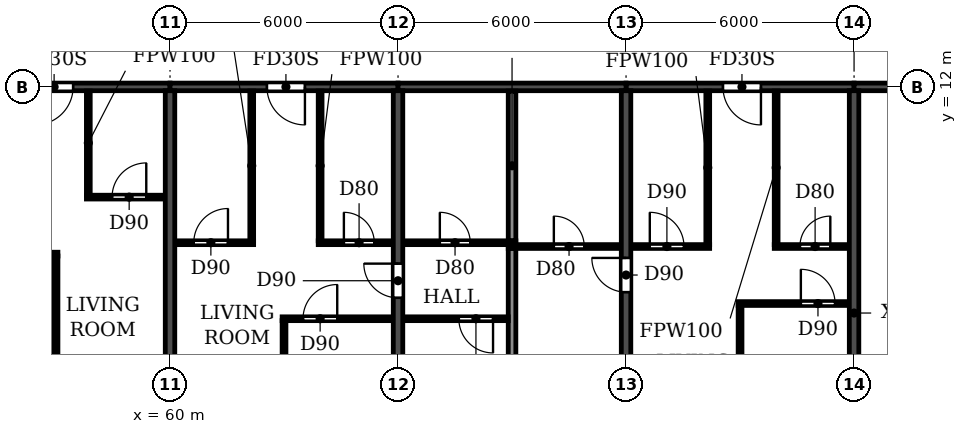
"""IFC4 building model, lengths in metres.
Left out: names, types, materials, properties, quantities, classifications, styles, units other than length and angle.
Written with IfcOpenShell. Run it as: python <this file> out.ifc"""

import sys

from ifc_helpers import new_model, si_unit, direction, frame, frame_2d, origin, place, context, subcontext, project, spatial, rectangle, extrude, element, fill, save


model = new_model("IFC4")
c1 = context("Model", 3, precision=1e-05, world=origin(), true_north=direction((0.0, 1.0)))
c2 = subcontext(c1, "Body", "Model", "MODEL_VIEW")
j1 = project(units=[si_unit("LENGTHUNIT", "METRE"), si_unit("PLANEANGLEUNIT", "RADIAN")], contexts=[c1])
p1 = place(None, origin())
s1 = spatial("IfcSite", under=j1, at=p1, CompositionType="ELEMENT")
p2 = place(p1, origin())
s2 = spatial("IfcBuilding", under=s1, at=p2, CompositionType="ELEMENT")
p3 = place(p2, frame((0.0, 0.0, 181.8)))
s3 = spatial("IfcBuildingStorey", under=s2, at=p3, CompositionType="ELEMENT", Elevation=181.8)
p4 = place(p3, frame((60.0, 0.2, 0.0), z_axis=(0.0, 0.0, 1.0), x_axis=(0.0, 1.0, 0.0)))
e1 = element("IfcWall", 1, at=p4, inside=s3, PredefinedType="SHEAR", context=c2, shape_type="SweptSolid", body=[
    extrude(rectangle(XDim=11.7, YDim=0.25, at=frame_2d((5.85, 0.0))), origin(), (0.0, 0.0, 1.0), 3.08),
])
p5 = place(p3, frame((66.0, 0.2, 0.0), z_axis=(0.0, 0.0, 1.0), x_axis=(0.0, 1.0, 0.0)))
e2 = element("IfcWall", 2, at=p5, inside=s3, PredefinedType="SHEAR", context=c2, shape_type="SweptSolid", body=[
    extrude(rectangle(XDim=11.7, YDim=0.25, at=frame_2d((5.85, 0.0))), origin(), (0.0, 0.0, 1.0), 3.08),
])
p6 = place(p5, frame((6.25, 0.0, 0.0)))
e3 = element("IfcOpeningElement", 3, at=p6, cuts=e2, PredefinedType="OPENING", context=c2, shape_type="SweptSolid", body=[
    extrude(rectangle(XDim=0.9, YDim=2.1, at=frame_2d((0.45, 1.05))), frame((0.0, 0.135, 0.0), z_axis=(0.0, -1.0, 0.0), x_axis=(1.0, 0.0, 0.0)), (0.0, 0.0, 1.0), 0.27),
])
p7 = place(p3, frame((72.0, 0.2, 0.0), z_axis=(0.0, 0.0, 1.0), x_axis=(0.0, 1.0, 0.0)))
e4 = element("IfcWall", 4, at=p7, inside=s3, PredefinedType="SHEAR", context=c2, shape_type="SweptSolid", body=[
    extrude(rectangle(XDim=11.7, YDim=0.25, at=frame_2d((5.85, 0.0))), origin(), (0.0, 0.0, 1.0), 3.08),
])
p8 = place(p7, frame((6.4, 0.0, 0.0)))
e5 = element("IfcOpeningElement", 5, at=p8, cuts=e4, PredefinedType="OPENING", context=c2, shape_type="SweptSolid", body=[
    extrude(rectangle(XDim=0.9, YDim=2.1, at=frame_2d((0.45, 1.05))), frame((0.0, 0.135, 0.0), z_axis=(0.0, -1.0, 0.0), x_axis=(1.0, 0.0, 0.0)), (0.0, 0.0, 1.0), 0.27),
])
p9 = place(p3, frame((78.0, 0.2, 0.0), z_axis=(0.0, 0.0, 1.0), x_axis=(0.0, 1.0, 0.0)))
e6 = element("IfcWall", 6, at=p9, inside=s3, PredefinedType="SHEAR", context=c2, shape_type="SweptSolid", body=[
    extrude(rectangle(XDim=11.7, YDim=0.25, at=frame_2d((5.85, 0.0))), origin(), (0.0, 0.0, 1.0), 3.08),
])
p10 = place(p3, frame((54.0, 12.0, 0.0), z_axis=(0.0, 0.0, 1.0), x_axis=(1.0, 0.0, 0.0)))
e7 = element("IfcWall", 7, at=p10, inside=s3, PredefinedType="SHEAR", context=c2, shape_type="SweptSolid", body=[
    extrude(rectangle(XDim=6.0, YDim=0.2, at=frame_2d((3.0, 0.0))), origin(), (0.0, 0.0, 1.0), 2.48),
])
p11 = place(p10, frame((2.45, 0.0, 0.0)))
e8 = element("IfcOpeningElement", 8, at=p11, cuts=e7, PredefinedType="OPENING", context=c2, shape_type="SweptSolid", body=[
    extrude(rectangle(XDim=1.0, YDim=2.1, at=frame_2d((0.5, 1.05))), frame((0.0, 0.11, 0.0), z_axis=(0.0, -1.0, 0.0), x_axis=(1.0, 0.0, 0.0)), (0.0, 0.0, 1.0), 0.22),
])
p12 = place(p3, frame((60.0, 12.0, 0.0), z_axis=(0.0, 0.0, 1.0), x_axis=(1.0, 0.0, 0.0)))
e9 = element("IfcWall", 9, at=p12, inside=s3, PredefinedType="SHEAR", context=c2, shape_type="SweptSolid", body=[
    extrude(rectangle(XDim=6.0, YDim=0.2, at=frame_2d((3.0, 0.0))), origin(), (0.0, 0.0, 1.0), 2.48),
])
p13 = place(p12, frame((2.55, 0.0, 0.0)))
e10 = element("IfcOpeningElement", 10, at=p13, cuts=e9, PredefinedType="OPENING", context=c2, shape_type="SweptSolid", body=[
    extrude(rectangle(XDim=1.0, YDim=2.1, at=frame_2d((0.5, 1.05))), frame((0.0, 0.11, 0.0), z_axis=(0.0, -1.0, 0.0), x_axis=(1.0, 0.0, 0.0)), (0.0, 0.0, 1.0), 0.22),
])
p14 = place(p3, frame((66.0, 12.0, 0.0), z_axis=(0.0, 0.0, 1.0), x_axis=(1.0, 0.0, 0.0)))
e11 = element("IfcWall", 11, at=p14, inside=s3, PredefinedType="SHEAR", context=c2, shape_type="SweptSolid", body=[
    extrude(rectangle(XDim=6.0, YDim=0.2, at=frame_2d((3.0, 0.0))), origin(), (0.0, 0.0, 1.0), 2.48),
])
p15 = place(p3, frame((72.0, 12.0, 0.0), z_axis=(0.0, 0.0, 1.0), x_axis=(1.0, 0.0, 0.0)))
e12 = element("IfcWall", 12, at=p15, inside=s3, PredefinedType="SHEAR", context=c2, shape_type="SweptSolid", body=[
    extrude(rectangle(XDim=6.0, YDim=0.2, at=frame_2d((3.0, 0.0))), origin(), (0.0, 0.0, 1.0), 2.48),
])
p16 = place(p15, frame((2.55, 0.0, 0.0)))
e13 = element("IfcOpeningElement", 13, at=p16, cuts=e12, PredefinedType="OPENING", context=c2, shape_type="SweptSolid", body=[
    extrude(rectangle(XDim=1.0, YDim=2.1, at=frame_2d((0.5, 1.05))), frame((0.0, 0.11, 0.0), z_axis=(0.0, -1.0, 0.0), x_axis=(1.0, 0.0, 0.0)), (0.0, 0.0, 1.0), 0.22),
])
p17 = place(p3, frame((78.0, 12.0, 0.0), z_axis=(0.0, 0.0, 1.0), x_axis=(1.0, 0.0, 0.0)))
e14 = element("IfcWall", 14, at=p17, inside=s3, PredefinedType="SHEAR", context=c2, shape_type="SweptSolid", body=[
    extrude(rectangle(XDim=5.8, YDim=0.2, at=frame_2d((2.9, 0.0))), origin(), (0.0, 0.0, 1.0), 2.48),
])
p18 = place(p17, frame((2.5, 0.0, 0.0)))
e15 = element("IfcOpeningElement", 15, at=p18, cuts=e14, PredefinedType="OPENING", context=c2, shape_type="SweptSolid", body=[
    extrude(rectangle(XDim=1.0, YDim=2.1, at=frame_2d((0.5, 1.05))), frame((0.0, 0.11, 0.0), z_axis=(0.0, -1.0, 0.0), x_axis=(1.0, 0.0, 0.0)), (0.0, 0.0, 1.0), 0.22),
])
p19 = place(p3, frame((69.0, 0.06, 0.0), z_axis=(0.0, 0.0, 1.0), x_axis=(0.0, 1.0, 0.0)))
e16 = element("IfcWall", 16, at=p19, inside=s3, PredefinedType="PARTITIONING", context=c2, shape_type="SweptSolid", body=[
    extrude(rectangle(XDim=7.69, YDim=0.2, at=frame_2d((3.845, 0.0))), origin(), (0.0, 0.0, 1.0), 3.08),
])
p20 = place(p3, frame((69.0, 7.95, 0.0), z_axis=(0.0, 0.0, 1.0), x_axis=(0.0, 1.0, 0.0)))
e17 = element("IfcWall", 17, at=p20, inside=s3, PredefinedType="PARTITIONING", context=c2, shape_type="SweptSolid", body=[
    extrude(rectangle(XDim=3.94, YDim=0.2, at=frame_2d((1.97, 0.0))), origin(), (0.0, 0.0, 1.0), 3.08),
])
p21 = place(p3, frame((62.95, 5.9, 0.0), z_axis=(0.0, 0.0, 1.0), x_axis=(1.0, 0.0, 0.0)))
e18 = element("IfcWall", 18, at=p21, inside=s3, PredefinedType="PARTITIONING", context=c2, shape_type="SweptSolid", body=[
    extrude(rectangle(XDim=2.915, YDim=0.1, at=frame_2d((1.458, 0.0))), origin(), (0.0, 0.0, 1.0), 3.08),
])
p22 = place(p21, frame((0.55, 0.0, 0.0)))
e19 = element("IfcOpeningElement", 19, at=p22, cuts=e18, PredefinedType="OPENING", context=c2, shape_type="SweptSolid", body=[
    extrude(rectangle(XDim=0.9, YDim=2.1, at=frame_2d((0.45, 1.05))), frame((0.0, 0.06, 0.0), z_axis=(0.0, -1.0, 0.0), x_axis=(1.0, 0.0, 0.0)), (0.0, 0.0, 1.0), 0.12),
])
p23 = place(p3, frame((66.135, 5.9, 0.0), z_axis=(0.0, 0.0, 1.0), x_axis=(1.0, 0.0, 0.0)))
e20 = element("IfcWall", 20, at=p23, inside=s3, PredefinedType="PARTITIONING", context=c2, shape_type="SweptSolid", body=[
    extrude(rectangle(XDim=2.765, YDim=0.1, at=frame_2d((1.382, 0.0))), origin(), (0.0, 0.0, 1.0), 3.08),
])
p24 = place(p23, frame((1.465, 0.0, 0.0)))
e21 = element("IfcOpeningElement", 21, at=p24, cuts=e20, PredefinedType="OPENING", context=c2, shape_type="SweptSolid", body=[
    extrude(rectangle(XDim=0.9, YDim=2.1, at=frame_2d((0.45, 1.05))), frame((0.0, 0.06, 0.0), z_axis=(0.0, -1.0, 0.0), x_axis=(1.0, 0.0, 0.0)), (0.0, 0.0, 1.0), 0.12),
])
p25 = place(p3, frame((74.95, 6.3, 0.0), z_axis=(0.0, 0.0, 1.0), x_axis=(1.0, 0.0, 0.0)))
e22 = element("IfcWall", 22, at=p25, inside=s3, PredefinedType="PARTITIONING", context=c2, shape_type="SweptSolid", body=[
    extrude(rectangle(XDim=2.915, YDim=0.1, at=frame_2d((1.458, 0.0))), origin(), (0.0, 0.0, 1.0), 3.08),
])
p26 = place(p25, frame((1.65, 0.0, 0.0)))
e23 = element("IfcOpeningElement", 23, at=p26, cuts=e22, PredefinedType="OPENING", context=c2, shape_type="SweptSolid", body=[
    extrude(rectangle(XDim=0.9, YDim=2.1, at=frame_2d((0.45, 1.05))), frame((0.0, 0.06, 0.0), z_axis=(0.0, -1.0, 0.0), x_axis=(1.0, 0.0, 0.0)), (0.0, 0.0, 1.0), 0.12),
])
p27 = place(p3, frame((54.135, 7.6, 0.0), z_axis=(0.0, 0.0, 1.0), x_axis=(1.0, 0.0, 0.0)))
e24 = element("IfcWall", 24, at=p27, inside=s3, PredefinedType="PARTITIONING", context=c2, shape_type="SweptSolid", body=[
    extrude(rectangle(XDim=2.915, YDim=0.1, at=frame_2d((1.458, 0.0))), origin(), (0.0, 0.0, 1.0), 3.08),
])
p28 = place(p27, frame((0.365, 0.0, 0.0)))
e25 = element("IfcOpeningElement", 25, at=p28, cuts=e24, PredefinedType="OPENING", context=c2, shape_type="SweptSolid", body=[
    extrude(rectangle(XDim=0.9, YDim=2.1, at=frame_2d((0.45, 1.05))), frame((0.0, 0.06, 0.0), z_axis=(0.0, -1.0, 0.0), x_axis=(1.0, 0.0, 0.0)), (0.0, 0.0, 1.0), 0.12),
])
p29 = place(p3, frame((68.9, 7.8, 0.0), z_axis=(0.0, 0.0, 1.0), x_axis=(1.0, 0.0, 0.0)))
e26 = element("IfcWall", 26, at=p29, inside=s3, PredefinedType="PARTITIONING", context=c2, shape_type="SweptSolid", body=[
    extrude(rectangle(XDim=2.965, YDim=0.1, at=frame_2d((1.482, 0.0))), origin(), (0.0, 0.0, 1.0), 3.08),
])
p30 = place(p29, frame((1.2, 0.0, 0.0)))
e27 = element("IfcOpeningElement", 27, at=p30, cuts=e26, PredefinedType="OPENING", context=c2, shape_type="SweptSolid", body=[
    extrude(rectangle(XDim=0.8, YDim=2.1, at=frame_2d((0.4, 1.05))), frame((0.0, 0.06, 0.0), z_axis=(0.0, -1.0, 0.0), x_axis=(1.0, 0.0, 0.0)), (0.0, 0.0, 1.0), 0.12),
])
p31 = place(p3, frame((72.135, 7.8, 0.0), z_axis=(0.0, 0.0, 1.0), x_axis=(1.0, 0.0, 0.0)))
e28 = element("IfcWall", 28, at=p31, inside=s3, PredefinedType="PARTITIONING", context=c2, shape_type="SweptSolid", body=[
    extrude(rectangle(XDim=2.065, YDim=0.1, at=frame_2d((1.032, 0.0))), origin(), (0.0, 0.0, 1.0), 3.08),
])
p32 = place(p31, frame((0.49, 0.0, 0.0)))
e29 = element("IfcOpeningElement", 29, at=p32, cuts=e28, PredefinedType="OPENING", context=c2, shape_type="SweptSolid", body=[
    extrude(rectangle(XDim=0.9, YDim=2.1, at=frame_2d((0.45, 1.05))), frame((0.0, 0.06, 0.0), z_axis=(0.0, -1.0, 0.0), x_axis=(1.0, 0.0, 0.0)), (0.0, 0.0, 1.0), 0.12),
])
p33 = place(p3, frame((75.9, 7.8, 0.0), z_axis=(0.0, 0.0, 1.0), x_axis=(1.0, 0.0, 0.0)))
e30 = element("IfcWall", 30, at=p33, inside=s3, PredefinedType="PARTITIONING", context=c2, shape_type="SweptSolid", body=[
    extrude(rectangle(XDim=1.965, YDim=0.1, at=frame_2d((0.982, 0.0))), origin(), (0.0, 0.0, 1.0), 3.08),
])
p34 = place(p33, frame((0.675, 0.0, 0.0)))
e31 = element("IfcOpeningElement", 31, at=p34, cuts=e30, PredefinedType="OPENING", context=c2, shape_type="SweptSolid", body=[
    extrude(rectangle(XDim=0.8, YDim=2.1, at=frame_2d((0.4, 1.05))), frame((0.0, 0.06, 0.0), z_axis=(0.0, -1.0, 0.0), x_axis=(1.0, 0.0, 0.0)), (0.0, 0.0, 1.0), 0.12),
])
p35 = place(p3, frame((60.135, 7.9, 0.0), z_axis=(0.0, 0.0, 1.0), x_axis=(1.0, 0.0, 0.0)))
e32 = element("IfcWall", 32, at=p35, inside=s3, PredefinedType="PARTITIONING", context=c2, shape_type="SweptSolid", body=[
    extrude(rectangle(XDim=2.065, YDim=0.1, at=frame_2d((1.032, 0.0))), origin(), (0.0, 0.0, 1.0), 3.08),
])
p36 = place(p35, frame((0.49, 0.0, 0.0)))
e33 = element("IfcOpeningElement", 33, at=p36, cuts=e32, PredefinedType="OPENING", context=c2, shape_type="SweptSolid", body=[
    extrude(rectangle(XDim=0.9, YDim=2.1, at=frame_2d((0.45, 1.05))), frame((0.0, 0.06, 0.0), z_axis=(0.0, -1.0, 0.0), x_axis=(1.0, 0.0, 0.0)), (0.0, 0.0, 1.0), 0.12),
])
p37 = place(p3, frame((63.9, 7.9, 0.0), z_axis=(0.0, 0.0, 1.0), x_axis=(1.0, 0.0, 0.0)))
e34 = element("IfcWall", 34, at=p37, inside=s3, PredefinedType="PARTITIONING", context=c2, shape_type="SweptSolid", body=[
    extrude(rectangle(XDim=1.965, YDim=0.1, at=frame_2d((0.982, 0.0))), origin(), (0.0, 0.0, 1.0), 3.08),
])
p38 = place(p37, frame((0.675, 0.0, 0.0)))
e35 = element("IfcOpeningElement", 35, at=p38, cuts=e34, PredefinedType="OPENING", context=c2, shape_type="SweptSolid", body=[
    extrude(rectangle(XDim=0.8, YDim=2.1, at=frame_2d((0.4, 1.05))), frame((0.0, 0.06, 0.0), z_axis=(0.0, -1.0, 0.0), x_axis=(1.0, 0.0, 0.0)), (0.0, 0.0, 1.0), 0.12),
])
p39 = place(p3, frame((66.135, 7.9, 0.0), z_axis=(0.0, 0.0, 1.0), x_axis=(1.0, 0.0, 0.0)))
e36 = element("IfcWall", 36, at=p39, inside=s3, PredefinedType="PARTITIONING", context=c2, shape_type="SweptSolid", body=[
    extrude(rectangle(XDim=2.965, YDim=0.1, at=frame_2d((1.482, 0.0))), origin(), (0.0, 0.0, 1.0), 3.08),
])
p40 = place(p39, frame((0.965, 0.0, 0.0)))
e37 = element("IfcOpeningElement", 37, at=p40, cuts=e36, PredefinedType="OPENING", context=c2, shape_type="SweptSolid", body=[
    extrude(rectangle(XDim=0.8, YDim=2.1, at=frame_2d((0.4, 1.05))), frame((0.0, 0.06, 0.0), z_axis=(0.0, -1.0, 0.0), x_axis=(1.0, 0.0, 0.0)), (0.0, 0.0, 1.0), 0.12),
])
p41 = place(p3, frame((57.8, 9.1, 0.0), z_axis=(0.0, 0.0, 1.0), x_axis=(1.0, 0.0, 0.0)))
e38 = element("IfcWall", 38, at=p41, inside=s3, PredefinedType="PARTITIONING", context=c2, shape_type="SweptSolid", body=[
    extrude(rectangle(XDim=2.065, YDim=0.1, at=frame_2d((1.032, 0.0))), origin(), (0.0, 0.0, 1.0), 3.08),
])
p42 = place(p41, frame((0.675, 0.0, 0.0)))
e39 = element("IfcOpeningElement", 39, at=p42, cuts=e38, PredefinedType="OPENING", context=c2, shape_type="SweptSolid", body=[
    extrude(rectangle(XDim=0.9, YDim=2.1, at=frame_2d((0.45, 1.05))), frame((0.0, 0.06, 0.0), z_axis=(0.0, -1.0, 0.0), x_axis=(1.0, 0.0, 0.0)), (0.0, 0.0, 1.0), 0.12),
])
p43 = place(p3, frame((57.0, 0.06, 0.0), z_axis=(0.0, 0.0, 1.0), x_axis=(0.0, 1.0, 0.0)))
e40 = element("IfcWall", 40, at=p43, inside=s3, PredefinedType="PARTITIONING", context=c2, shape_type="SweptSolid", body=[
    extrude(rectangle(XDim=7.49, YDim=0.1, at=frame_2d((3.745, 0.0))), origin(), (0.0, 0.0, 1.0), 3.08),
])
p44 = place(p3, frame((57.85, 9.15, 0.0), z_axis=(0.0, 0.0, 1.0), x_axis=(0.0, 1.0, 0.0)))
e41 = element("IfcWall", 41, at=p44, inside=s3, PredefinedType="PARTITIONING", context=c2, shape_type="SweptSolid", body=[
    extrude(rectangle(XDim=2.74, YDim=0.1, at=frame_2d((1.37, 0.0))), origin(), (0.0, 0.0, 1.0), 3.08),
])
p45 = place(p3, frame((62.15, 7.95, 0.0), z_axis=(0.0, 0.0, 1.0), x_axis=(0.0, 1.0, 0.0)))
e42 = element("IfcWall", 42, at=p45, inside=s3, PredefinedType="PARTITIONING", context=c2, shape_type="SweptSolid", body=[
    extrude(rectangle(XDim=3.94, YDim=0.1, at=frame_2d((1.97, 0.0))), origin(), (0.0, 0.0, 1.0), 3.08),
])
p46 = place(p3, frame((63.0, 0.06, 0.0), z_axis=(0.0, 0.0, 1.0), x_axis=(0.0, 1.0, 0.0)))
e43 = element("IfcWall", 43, at=p46, inside=s3, PredefinedType="PARTITIONING", context=c2, shape_type="SweptSolid", body=[
    extrude(rectangle(XDim=5.79, YDim=0.1, at=frame_2d((2.895, 0.0))), origin(), (0.0, 0.0, 1.0), 3.08),
])
p47 = place(p3, frame((63.95, 7.95, 0.0), z_axis=(0.0, 0.0, 1.0), x_axis=(0.0, 1.0, 0.0)))
e44 = element("IfcWall", 44, at=p47, inside=s3, PredefinedType="PARTITIONING", context=c2, shape_type="SweptSolid", body=[
    extrude(rectangle(XDim=3.94, YDim=0.1, at=frame_2d((1.97, 0.0))), origin(), (0.0, 0.0, 1.0), 3.08),
])
p48 = place(p3, frame((74.15, 7.85, 0.0), z_axis=(0.0, 0.0, 1.0), x_axis=(0.0, 1.0, 0.0)))
e45 = element("IfcWall", 45, at=p48, inside=s3, PredefinedType="PARTITIONING", context=c2, shape_type="SweptSolid", body=[
    extrude(rectangle(XDim=4.04, YDim=0.1, at=frame_2d((2.02, 0.0))), origin(), (0.0, 0.0, 1.0), 3.08),
])
p49 = place(p3, frame((75.0, 0.06, 0.0), z_axis=(0.0, 0.0, 1.0), x_axis=(0.0, 1.0, 0.0)))
e46 = element("IfcWall", 46, at=p49, inside=s3, PredefinedType="PARTITIONING", context=c2, shape_type="SweptSolid", body=[
    extrude(rectangle(XDim=6.19, YDim=0.1, at=frame_2d((3.095, 0.0))), origin(), (0.0, 0.0, 1.0), 3.08),
])
p50 = place(p3, frame((75.95, 7.85, 0.0), z_axis=(0.0, 0.0, 1.0), x_axis=(0.0, 1.0, 0.0)))
e47 = element("IfcWall", 47, at=p50, inside=s3, PredefinedType="PARTITIONING", context=c2, shape_type="SweptSolid", body=[
    extrude(rectangle(XDim=4.04, YDim=0.1, at=frame_2d((2.02, 0.0))), origin(), (0.0, 0.0, 1.0), 3.08),
])
p51 = place(p11, frame((1.0, 0.0, 0.0), z_axis=(0.0, 0.0, 1.0), x_axis=(-1.0, 0.0, 0.0)))
e48 = element("IfcDoor", 48, at=p51, inside=s3, OperationType="SINGLE_SWING_RIGHT", PredefinedType="DOOR", context=c2, shape_type="SweptSolid", body=[
    extrude(rectangle(XDim=1.0, YDim=2.1, at=frame_2d((0.5, 1.05))), frame((0.0, 0.025, 0.0), z_axis=(0.0, -1.0, 0.0), x_axis=(1.0, 0.0, 0.0)), (0.0, 0.0, 1.0), 0.05),
])
fill(e8, e48)
p52 = place(p42, origin())
e49 = element("IfcDoor", 49, at=p52, inside=s3, OperationType="SINGLE_SWING_RIGHT", PredefinedType="DOOR", context=c2, shape_type="SweptSolid", body=[
    extrude(rectangle(XDim=0.9, YDim=2.1, at=frame_2d((0.45, 1.05))), frame((0.0, 0.025, 0.0), z_axis=(0.0, -1.0, 0.0), x_axis=(1.0, 0.0, 0.0)), (0.0, 0.0, 1.0), 0.05),
])
fill(e39, e49)
p53 = place(p40, origin())
e50 = element("IfcDoor", 50, at=p53, inside=s3, OperationType="SINGLE_SWING_LEFT", PredefinedType="DOOR", context=c2, shape_type="SweptSolid", body=[
    extrude(rectangle(XDim=0.8, YDim=2.1, at=frame_2d((0.4, 1.05))), frame((0.0, 0.025, 0.0), z_axis=(0.0, -1.0, 0.0), x_axis=(1.0, 0.0, 0.0)), (0.0, 0.0, 1.0), 0.05),
])
fill(e37, e50)
p54 = place(p24, frame((0.9, 0.0, 0.0), z_axis=(0.0, 0.0, 1.0), x_axis=(-1.0, 0.0, 0.0)))
e51 = element("IfcDoor", 51, at=p54, inside=s3, OperationType="SINGLE_SWING_LEFT", PredefinedType="DOOR", context=c2, shape_type="SweptSolid", body=[
    extrude(rectangle(XDim=0.9, YDim=2.1, at=frame_2d((0.45, 1.05))), frame((0.0, 0.025, 0.0), z_axis=(0.0, -1.0, 0.0), x_axis=(1.0, 0.0, 0.0)), (0.0, 0.0, 1.0), 0.05),
])
fill(e21, e51)
p55 = place(p36, origin())
e52 = element("IfcDoor", 52, at=p55, inside=s3, OperationType="SINGLE_SWING_RIGHT", PredefinedType="DOOR", context=c2, shape_type="SweptSolid", body=[
    extrude(rectangle(XDim=0.9, YDim=2.1, at=frame_2d((0.45, 1.05))), frame((0.0, 0.025, 0.0), z_axis=(0.0, -1.0, 0.0), x_axis=(1.0, 0.0, 0.0)), (0.0, 0.0, 1.0), 0.05),
])
fill(e33, e52)
p56 = place(p13, frame((1.0, 0.0, 0.0), z_axis=(0.0, 0.0, 1.0), x_axis=(-1.0, 0.0, 0.0)))
e53 = element("IfcDoor", 53, at=p56, inside=s3, OperationType="SINGLE_SWING_LEFT", PredefinedType="DOOR", context=c2, shape_type="SweptSolid", body=[
    extrude(rectangle(XDim=1.0, YDim=2.1, at=frame_2d((0.5, 1.05))), frame((0.0, 0.025, 0.0), z_axis=(0.0, -1.0, 0.0), x_axis=(1.0, 0.0, 0.0)), (0.0, 0.0, 1.0), 0.05),
])
fill(e10, e53)
p57 = place(p22, origin())
e54 = element("IfcDoor", 54, at=p57, inside=s3, OperationType="SINGLE_SWING_RIGHT", PredefinedType="DOOR", context=c2, shape_type="SweptSolid", body=[
    extrude(rectangle(XDim=0.9, YDim=2.1, at=frame_2d((0.45, 1.05))), frame((0.0, 0.025, 0.0), z_axis=(0.0, -1.0, 0.0), x_axis=(1.0, 0.0, 0.0)), (0.0, 0.0, 1.0), 0.05),
])
fill(e19, e54)
p58 = place(p38, origin())
e55 = element("IfcDoor", 55, at=p58, inside=s3, OperationType="SINGLE_SWING_LEFT", PredefinedType="DOOR", context=c2, shape_type="SweptSolid", body=[
    extrude(rectangle(XDim=0.8, YDim=2.1, at=frame_2d((0.4, 1.05))), frame((0.0, 0.025, 0.0), z_axis=(0.0, -1.0, 0.0), x_axis=(1.0, 0.0, 0.0)), (0.0, 0.0, 1.0), 0.05),
])
fill(e35, e55)
p59 = place(p6, origin())
e56 = element("IfcDoor", 56, at=p59, inside=s3, OperationType="SINGLE_SWING_RIGHT", PredefinedType="DOOR", context=c2, shape_type="SweptSolid", body=[
    extrude(rectangle(XDim=0.9, YDim=2.1, at=frame_2d((0.45, 1.05))), frame((0.0, 0.025, 0.0), z_axis=(0.0, -1.0, 0.0), x_axis=(1.0, 0.0, 0.0)), (0.0, 0.0, 1.0), 0.05),
])
fill(e3, e56)
p60 = place(p30, origin())
e57 = element("IfcDoor", 57, at=p60, inside=s3, OperationType="SINGLE_SWING_LEFT", PredefinedType="DOOR", context=c2, shape_type="SweptSolid", body=[
    extrude(rectangle(XDim=0.8, YDim=2.1, at=frame_2d((0.4, 1.05))), frame((0.0, 0.025, 0.0), z_axis=(0.0, -1.0, 0.0), x_axis=(1.0, 0.0, 0.0)), (0.0, 0.0, 1.0), 0.05),
])
fill(e27, e57)
p61 = place(p8, origin())
e58 = element("IfcDoor", 58, at=p61, inside=s3, OperationType="SINGLE_SWING_RIGHT", PredefinedType="DOOR", context=c2, shape_type="SweptSolid", body=[
    extrude(rectangle(XDim=0.9, YDim=2.1, at=frame_2d((0.45, 1.05))), frame((0.0, 0.025, 0.0), z_axis=(0.0, -1.0, 0.0), x_axis=(1.0, 0.0, 0.0)), (0.0, 0.0, 1.0), 0.05),
])
fill(e5, e58)
p62 = place(p32, origin())
e59 = element("IfcDoor", 59, at=p62, inside=s3, OperationType="SINGLE_SWING_LEFT", PredefinedType="DOOR", context=c2, shape_type="SweptSolid", body=[
    extrude(rectangle(XDim=0.9, YDim=2.1, at=frame_2d((0.45, 1.05))), frame((0.0, 0.025, 0.0), z_axis=(0.0, -1.0, 0.0), x_axis=(1.0, 0.0, 0.0)), (0.0, 0.0, 1.0), 0.05),
])
fill(e29, e59)
p63 = place(p16, frame((1.0, 0.0, 0.0), z_axis=(0.0, 0.0, 1.0), x_axis=(-1.0, 0.0, 0.0)))
e60 = element("IfcDoor", 60, at=p63, inside=s3, OperationType="SINGLE_SWING_LEFT", PredefinedType="DOOR", context=c2, shape_type="SweptSolid", body=[
    extrude(rectangle(XDim=1.0, YDim=2.1, at=frame_2d((0.5, 1.05))), frame((0.0, 0.025, 0.0), z_axis=(0.0, -1.0, 0.0), x_axis=(1.0, 0.0, 0.0)), (0.0, 0.0, 1.0), 0.05),
])
fill(e13, e60)
p64 = place(p34, origin())
e61 = element("IfcDoor", 61, at=p64, inside=s3, OperationType="SINGLE_SWING_RIGHT", PredefinedType="DOOR", context=c2, shape_type="SweptSolid", body=[
    extrude(rectangle(XDim=0.8, YDim=2.1, at=frame_2d((0.4, 1.05))), frame((0.0, 0.025, 0.0), z_axis=(0.0, -1.0, 0.0), x_axis=(1.0, 0.0, 0.0)), (0.0, 0.0, 1.0), 0.05),
])
fill(e31, e61)
p65 = place(p26, origin())
e62 = element("IfcDoor", 62, at=p65, inside=s3, OperationType="SINGLE_SWING_LEFT", PredefinedType="DOOR", context=c2, shape_type="SweptSolid", body=[
    extrude(rectangle(XDim=0.9, YDim=2.1, at=frame_2d((0.45, 1.05))), frame((0.0, 0.025, 0.0), z_axis=(0.0, -1.0, 0.0), x_axis=(1.0, 0.0, 0.0)), (0.0, 0.0, 1.0), 0.05),
])
fill(e23, e62)
save(model, sys.argv[1])
